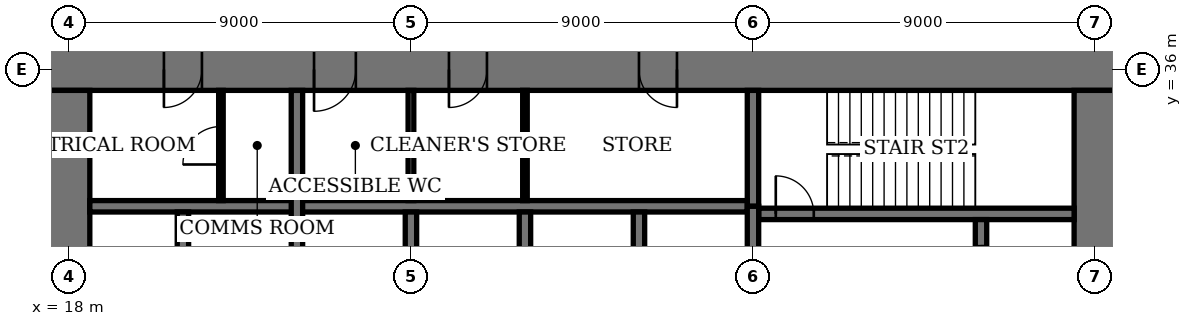
"""IFC4 building model, lengths in metres.
Left out: names, types, materials, properties, quantities, classifications, styles, units other than length and angle.
Written with IfcOpenShell. Run it as: python <this file> out.ifc"""

import sys

from ifc_helpers import new_model, si_unit, direction, frame, frame_2d, origin, place, context, subcontext, project, spatial, rectangle, extrude, element, fill, save


model = new_model("IFC4")
c1 = context("Model", 3, precision=1e-05, world=origin(), true_north=direction((0.0, 1.0)))
c2 = subcontext(c1, "Body", "Model", "MODEL_VIEW")
j1 = project(units=[si_unit("LENGTHUNIT", "METRE"), si_unit("PLANEANGLEUNIT", "RADIAN")], contexts=[c1])
p1 = place(None, origin())
s1 = spatial("IfcSite", under=j1, at=p1, CompositionType="ELEMENT")
p2 = place(p1, origin())
s2 = spatial("IfcBuilding", under=s1, at=p2, CompositionType="ELEMENT")
p3 = place(p2, frame((0.0, 0.0, 67.8)))
s3 = spatial("IfcBuildingStorey", under=s2, at=p3, CompositionType="ELEMENT", Elevation=67.8)
p4 = place(p3, frame((45.55, 36.0, 0.0), z_axis=(0.0, 0.0, 1.0), x_axis=(-1.0, 0.0, 0.0)))
e1 = element("IfcWall", 1, at=p4, inside=s3, PredefinedType="SHEAR", context=c2, shape_type="SweptSolid", body=[
    extrude(rectangle(XDim=28.1, YDim=1.1, at=frame_2d((14.05, 0.0))), origin(), (0.0, 0.0, 1.0), 4.0),
])
p5 = place(p4, frame((11.55, 0.0, 0.0)))
e2 = element("IfcOpeningElement", 2, at=p5, cuts=e1, PredefinedType="OPENING", context=c2, shape_type="SweptSolid", body=[
    extrude(rectangle(XDim=1.0, YDim=2.4, at=frame_2d((0.5, 1.2))), frame((0.0, 0.56, 0.0), z_axis=(0.0, -1.0, 0.0), x_axis=(1.0, 0.0, 0.0)), (0.0, 0.0, 1.0), 1.12),
])
p6 = place(p4, frame((16.55, 0.0, 0.0)))
e3 = element("IfcOpeningElement", 3, at=p6, cuts=e1, PredefinedType="OPENING", context=c2, shape_type="SweptSolid", body=[
    extrude(rectangle(XDim=1.0, YDim=2.4, at=frame_2d((0.5, 1.2))), frame((0.0, 0.56, 0.0), z_axis=(0.0, -1.0, 0.0), x_axis=(1.0, 0.0, 0.0)), (0.0, 0.0, 1.0), 1.12),
])
p7 = place(p4, frame((20.0, 0.0, 0.0)))
e4 = element("IfcOpeningElement", 4, at=p7, cuts=e1, PredefinedType="OPENING", context=c2, shape_type="SweptSolid", body=[
    extrude(rectangle(XDim=1.1, YDim=2.4, at=frame_2d((0.55, 1.2))), frame((0.0, 0.56, 0.0), z_axis=(0.0, -1.0, 0.0), x_axis=(1.0, 0.0, 0.0)), (0.0, 0.0, 1.0), 1.12),
])
p8 = place(p4, frame((24.05, 0.0, 0.0)))
e5 = element("IfcOpeningElement", 5, at=p8, cuts=e1, PredefinedType="OPENING", context=c2, shape_type="SweptSolid", body=[
    extrude(rectangle(XDim=1.0, YDim=2.4, at=frame_2d((0.5, 1.2))), frame((0.0, 0.56, 0.0), z_axis=(0.0, -1.0, 0.0), x_axis=(1.0, 0.0, 0.0)), (0.0, 0.0, 1.0), 1.12),
])
p9 = place(p3, frame((18.0, 35.45, 0.0), z_axis=(0.0, 0.0, 1.0), x_axis=(0.0, -1.0, 0.0)))
e6 = element("IfcWall", 6, at=p9, inside=s3, PredefinedType="SHEAR", context=c2, shape_type="SweptSolid", body=[
    extrude(rectangle(XDim=16.9, YDim=1.1, at=frame_2d((8.45, 0.0))), origin(), (0.0, 0.0, 1.0), 4.0),
])
p10 = place(p9, frame((8.45, 0.0, 0.0)))
e7 = element("IfcOpeningElement", 7, at=p10, cuts=e6, PredefinedType="OPENING", context=c2, shape_type="SweptSolid", body=[
    extrude(rectangle(XDim=1.8, YDim=2.4, at=frame_2d((0.9, 1.2))), frame((0.0, 0.56, 0.0), z_axis=(0.0, -1.0, 0.0), x_axis=(1.0, 0.0, 0.0)), (0.0, 0.0, 1.0), 1.12),
])
p11 = place(p3, frame((45.0, 18.55, 0.0), z_axis=(0.0, 0.0, 1.0), x_axis=(0.0, 1.0, 0.0)))
e8 = element("IfcWall", 8, at=p11, inside=s3, PredefinedType="SHEAR", context=c2, shape_type="SweptSolid", body=[
    extrude(rectangle(XDim=16.9, YDim=1.1, at=frame_2d((8.45, 0.0))), origin(), (0.0, 0.0, 1.0), 4.0),
])
p12 = place(p11, frame((8.45, 0.0, 0.0)))
e9 = element("IfcOpeningElement", 9, at=p12, cuts=e8, PredefinedType="OPENING", context=c2, shape_type="SweptSolid", body=[
    extrude(rectangle(XDim=1.8, YDim=2.4, at=frame_2d((0.9, 1.2))), frame((0.0, 0.56, 0.0), z_axis=(0.0, -1.0, 0.0), x_axis=(1.0, 0.0, 0.0)), (0.0, 0.0, 1.0), 1.12),
])
p13 = place(p3, frame((36.15, 32.2, 0.0), z_axis=(0.0, 0.0, 1.0), x_axis=(1.0, 0.0, 0.0)))
e10 = element("IfcWall", 10, at=p13, inside=s3, PredefinedType="SHEAR", context=c2, shape_type="SweptSolid", body=[
    extrude(rectangle(XDim=8.3, YDim=0.3, at=frame_2d((4.15, 0.0))), origin(), (0.0, 0.0, 1.0), 4.0),
])
p14 = place(p13, frame((0.45, 0.0, 0.0)))
e11 = element("IfcOpeningElement", 11, at=p14, cuts=e10, PredefinedType="OPENING", context=c2, shape_type="SweptSolid", body=[
    extrude(rectangle(XDim=1.0, YDim=2.4, at=frame_2d((0.5, 1.2))), frame((0.0, 0.16, 0.0), z_axis=(0.0, -1.0, 0.0), x_axis=(1.0, 0.0, 0.0)), (0.0, 0.0, 1.0), 0.32),
])
p15 = place(p3, frame((36.0, 32.4, 0.0), z_axis=(0.0, 0.0, 1.0), x_axis=(0.0, 1.0, 0.0)))
e12 = element("IfcWall", 12, at=p15, inside=s3, PredefinedType="SHEAR", context=c2, shape_type="SweptSolid", body=[
    extrude(rectangle(XDim=3.05, YDim=0.3, at=frame_2d((1.525, 0.0))), origin(), (0.0, 0.0, 1.0), 4.0),
])
p16 = place(p3, frame((42.0, 29.55, 0.0), z_axis=(0.0, 0.0, 1.0), x_axis=(0.0, 1.0, 0.0)))
e13 = element("IfcWall", 13, at=p16, inside=s3, PredefinedType="SHEAR", context=c2, shape_type="SweptSolid", body=[
    extrude(rectangle(XDim=2.5, YDim=0.3, at=frame_2d((1.25, 0.0))), origin(), (0.0, 0.0, 1.0), 4.0),
])
p17 = place(p16, frame((0.7, 0.0, 0.0)))
e14 = element("IfcOpeningElement", 14, at=p17, cuts=e13, PredefinedType="OPENING", context=c2, shape_type="SweptSolid", body=[
    extrude(rectangle(XDim=1.1, YDim=2.4, at=frame_2d((0.55, 1.2))), frame((0.0, 0.16, 0.0), z_axis=(0.0, -1.0, 0.0), x_axis=(1.0, 0.0, 0.0)), (0.0, 0.0, 1.0), 0.32),
])
p18 = place(p3, frame((18.55, 32.4, 0.0), z_axis=(0.0, 0.0, 1.0), x_axis=(1.0, 0.0, 0.0)))
e15 = element("IfcWall", 15, at=p18, inside=s3, PredefinedType="SHEAR", context=c2, shape_type="SweptSolid", body=[
    extrude(rectangle(XDim=17.3, YDim=0.3, at=frame_2d((8.65, 0.0))), origin(), (0.0, 0.0, 1.0), 4.0),
])
for number, where, z_axis, x_axis in (
    (16, (33.0, 29.55, 0.0), (0.0, 0.0, 1.0), (0.0, 1.0, 0.0)),
    (17, (30.0, 29.55, 0.0), (0.0, 0.0, 1.0), (0.0, 1.0, 0.0)),
    (18, (27.0, 29.55, 0.0), (0.0, 0.0, 1.0), (0.0, 1.0, 0.0)),
):
    element("IfcWall", number, at=place(p3, frame(where, z_axis=z_axis, x_axis=x_axis)), inside=s3, PredefinedType="SHEAR", context=c2, shape_type="SweptSolid", body=[
        extrude(rectangle(XDim=2.7, YDim=0.3, at=frame_2d((1.35, 0.0))), origin(), (0.0, 0.0, 1.0), 4.0),
    ])
p19 = place(p3, frame((24.0, 29.55, 0.0), z_axis=(0.0, 0.0, 1.0), x_axis=(0.0, 1.0, 0.0)))
e19 = element("IfcWall", 19, at=p19, inside=s3, PredefinedType="SHEAR", context=c2, shape_type="SweptSolid", body=[
    extrude(rectangle(XDim=5.9, YDim=0.3, at=frame_2d((2.95, 0.0))), origin(), (0.0, 0.0, 1.0), 4.0),
])
p20 = place(p3, frame((21.0, 29.55, 0.0), z_axis=(0.0, 0.0, 1.0), x_axis=(0.0, 1.0, 0.0)))
e20 = element("IfcWall", 20, at=p20, inside=s3, PredefinedType="SHEAR", context=c2, shape_type="SweptSolid", body=[
    extrude(rectangle(XDim=2.7, YDim=0.3, at=frame_2d((1.35, 0.0))), origin(), (0.0, 0.0, 1.0), 4.0),
])
p21 = place(p3, frame((36.0, 29.55, 0.0), z_axis=(0.0, 0.0, 1.0), x_axis=(0.0, 1.0, 0.0)))
e21 = element("IfcWall", 21, at=p21, inside=s3, PredefinedType="SHEAR", context=c2, shape_type="SweptSolid", body=[
    extrude(rectangle(XDim=2.85, YDim=0.3, at=frame_2d((1.425, 0.0))), origin(), (0.0, 0.0, 1.0), 4.0),
])
p22 = place(p3, frame((30.0, 32.55, 0.0), z_axis=(0.0, 0.0, 1.0), x_axis=(0.0, 1.0, 0.0)))
e22 = element("IfcWall", 22, at=p22, inside=s3, PredefinedType="PARTITIONING", context=c2, shape_type="SweptSolid", body=[
    extrude(rectangle(XDim=2.9, YDim=0.12, at=frame_2d((1.45, 0.0))), origin(), (0.0, 0.0, 1.0), 3.75),
])
p23 = place(p3, frame((27.0, 32.55, 0.0), z_axis=(0.0, 0.0, 1.0), x_axis=(0.0, 1.0, 0.0)))
e23 = element("IfcWall", 23, at=p23, inside=s3, PredefinedType="PARTITIONING", context=c2, shape_type="SweptSolid", body=[
    extrude(rectangle(XDim=2.9, YDim=0.15, at=frame_2d((1.45, 0.0))), origin(), (0.0, 0.0, 1.0), 3.75),
])
p24 = place(p3, frame((22.0, 32.55, 0.0), z_axis=(0.0, 0.0, 1.0), x_axis=(0.0, 1.0, 0.0)))
e24 = element("IfcWall", 24, at=p24, inside=s3, PredefinedType="PARTITIONING", context=c2, shape_type="SweptSolid", body=[
    extrude(rectangle(XDim=2.9, YDim=0.12, at=frame_2d((1.45, 0.0))), origin(), (0.0, 0.0, 1.0), 3.75),
])
p25 = place(p24, frame((0.95, 0.0, 0.0)))
e25 = element("IfcOpeningElement", 25, at=p25, cuts=e24, PredefinedType="OPENING", context=c2, shape_type="SweptSolid", body=[
    extrude(rectangle(XDim=1.0, YDim=2.4, at=frame_2d((0.5, 1.2))), frame((0.0, 0.07, 0.0), z_axis=(0.0, -1.0, 0.0), x_axis=(1.0, 0.0, 0.0)), (0.0, 0.0, 1.0), 0.14),
])
p26 = place(p5, origin())
e26 = element("IfcDoor", 26, at=p26, inside=s3, OperationType="SINGLE_SWING_RIGHT", PredefinedType="DOOR", context=c2, shape_type="SweptSolid", body=[
    extrude(rectangle(XDim=1.0, YDim=2.4, at=frame_2d((0.5, 1.2))), frame((0.0, 0.025, 0.0), z_axis=(0.0, -1.0, 0.0), x_axis=(1.0, 0.0, 0.0)), (0.0, 0.0, 1.0), 0.05),
    extrude(rectangle(XDim=0.04, YDim=2.4, at=frame_2d((0.02, 1.2))), frame((0.0, 0.4, 0.0), z_axis=(0.0, -1.0, 0.0), x_axis=(1.0, 0.0, 0.0)), (0.0, 0.0, 1.0), 0.8),
    extrude(rectangle(XDim=0.04, YDim=2.4, at=frame_2d((0.98, 1.2))), frame((0.0, 0.4, 0.0), z_axis=(0.0, -1.0, 0.0), x_axis=(1.0, 0.0, 0.0)), (0.0, 0.0, 1.0), 0.8),
    extrude(rectangle(XDim=1.0, YDim=0.04, at=frame_2d((0.5, 2.38))), frame((0.0, 0.4, 0.0), z_axis=(0.0, -1.0, 0.0), x_axis=(1.0, 0.0, 0.0)), (0.0, 0.0, 1.0), 0.8),
])
fill(e2, e26)
p27 = place(p6, origin())
e27 = element("IfcDoor", 27, at=p27, inside=s3, OperationType="SINGLE_SWING_LEFT", PredefinedType="DOOR", context=c2, shape_type="SweptSolid", body=[
    extrude(rectangle(XDim=1.0, YDim=2.4, at=frame_2d((0.5, 1.2))), frame((0.0, 0.025, 0.0), z_axis=(0.0, -1.0, 0.0), x_axis=(1.0, 0.0, 0.0)), (0.0, 0.0, 1.0), 0.05),
    extrude(rectangle(XDim=0.04, YDim=2.4, at=frame_2d((0.02, 1.2))), frame((0.0, 0.4, 0.0), z_axis=(0.0, -1.0, 0.0), x_axis=(1.0, 0.0, 0.0)), (0.0, 0.0, 1.0), 0.8),
    extrude(rectangle(XDim=0.04, YDim=2.4, at=frame_2d((0.98, 1.2))), frame((0.0, 0.4, 0.0), z_axis=(0.0, -1.0, 0.0), x_axis=(1.0, 0.0, 0.0)), (0.0, 0.0, 1.0), 0.8),
    extrude(rectangle(XDim=1.0, YDim=0.04, at=frame_2d((0.5, 2.38))), frame((0.0, 0.4, 0.0), z_axis=(0.0, -1.0, 0.0), x_axis=(1.0, 0.0, 0.0)), (0.0, 0.0, 1.0), 0.8),
])
fill(e3, e27)
p28 = place(p7, origin())
e28 = element("IfcDoor", 28, at=p28, inside=s3, OperationType="SINGLE_SWING_LEFT", PredefinedType="DOOR", context=c2, shape_type="SweptSolid", body=[
    extrude(rectangle(XDim=1.1, YDim=2.4, at=frame_2d((0.55, 1.2))), frame((0.0, 0.025, 0.0), z_axis=(0.0, -1.0, 0.0), x_axis=(1.0, 0.0, 0.0)), (0.0, 0.0, 1.0), 0.05),
    extrude(rectangle(XDim=0.04, YDim=2.4, at=frame_2d((0.02, 1.2))), frame((0.0, 0.44, 0.0), z_axis=(0.0, -1.0, 0.0), x_axis=(1.0, 0.0, 0.0)), (0.0, 0.0, 1.0), 0.88),
    extrude(rectangle(XDim=0.04, YDim=2.4, at=frame_2d((1.08, 1.2))), frame((0.0, 0.44, 0.0), z_axis=(0.0, -1.0, 0.0), x_axis=(1.0, 0.0, 0.0)), (0.0, 0.0, 1.0), 0.88),
    extrude(rectangle(XDim=1.1, YDim=0.04, at=frame_2d((0.55, 2.38))), frame((0.0, 0.44, 0.0), z_axis=(0.0, -1.0, 0.0), x_axis=(1.0, 0.0, 0.0)), (0.0, 0.0, 1.0), 0.88),
])
fill(e4, e28)
p29 = place(p8, origin())
e29 = element("IfcDoor", 29, at=p29, inside=s3, OperationType="SINGLE_SWING_LEFT", PredefinedType="DOOR", context=c2, shape_type="SweptSolid", body=[
    extrude(rectangle(XDim=1.0, YDim=2.4, at=frame_2d((0.5, 1.2))), frame((0.0, 0.025, 0.0), z_axis=(0.0, -1.0, 0.0), x_axis=(1.0, 0.0, 0.0)), (0.0, 0.0, 1.0), 0.05),
    extrude(rectangle(XDim=0.04, YDim=2.4, at=frame_2d((0.02, 1.2))), frame((0.0, 0.4, 0.0), z_axis=(0.0, -1.0, 0.0), x_axis=(1.0, 0.0, 0.0)), (0.0, 0.0, 1.0), 0.8),
    extrude(rectangle(XDim=0.04, YDim=2.4, at=frame_2d((0.98, 1.2))), frame((0.0, 0.4, 0.0), z_axis=(0.0, -1.0, 0.0), x_axis=(1.0, 0.0, 0.0)), (0.0, 0.0, 1.0), 0.8),
    extrude(rectangle(XDim=1.0, YDim=0.04, at=frame_2d((0.5, 2.38))), frame((0.0, 0.4, 0.0), z_axis=(0.0, -1.0, 0.0), x_axis=(1.0, 0.0, 0.0)), (0.0, 0.0, 1.0), 0.8),
])
fill(e5, e29)
p30 = place(p14, origin())
e30 = element("IfcDoor", 30, at=p30, inside=s3, OperationType="SINGLE_SWING_RIGHT", PredefinedType="DOOR", context=c2, shape_type="SweptSolid", body=[
    extrude(rectangle(XDim=1.0, YDim=2.4, at=frame_2d((0.5, 1.2))), frame((0.0, 0.03, 0.0), z_axis=(0.0, -1.0, 0.0), x_axis=(1.0, 0.0, 0.0)), (0.0, 0.0, 1.0), 0.06),
])
fill(e11, e30)
p31 = place(p25, origin())
e31 = element("IfcDoor", 31, at=p31, inside=s3, OperationType="SINGLE_SWING_RIGHT", PredefinedType="DOOR", context=c2, shape_type="SweptSolid", body=[
    extrude(rectangle(XDim=1.0, YDim=2.4, at=frame_2d((0.5, 1.2))), frame((0.0, 0.03, 0.0), z_axis=(0.0, -1.0, 0.0), x_axis=(1.0, 0.0, 0.0)), (0.0, 0.0, 1.0), 0.06),
])
fill(e25, e31)
save(model, sys.argv[1])
